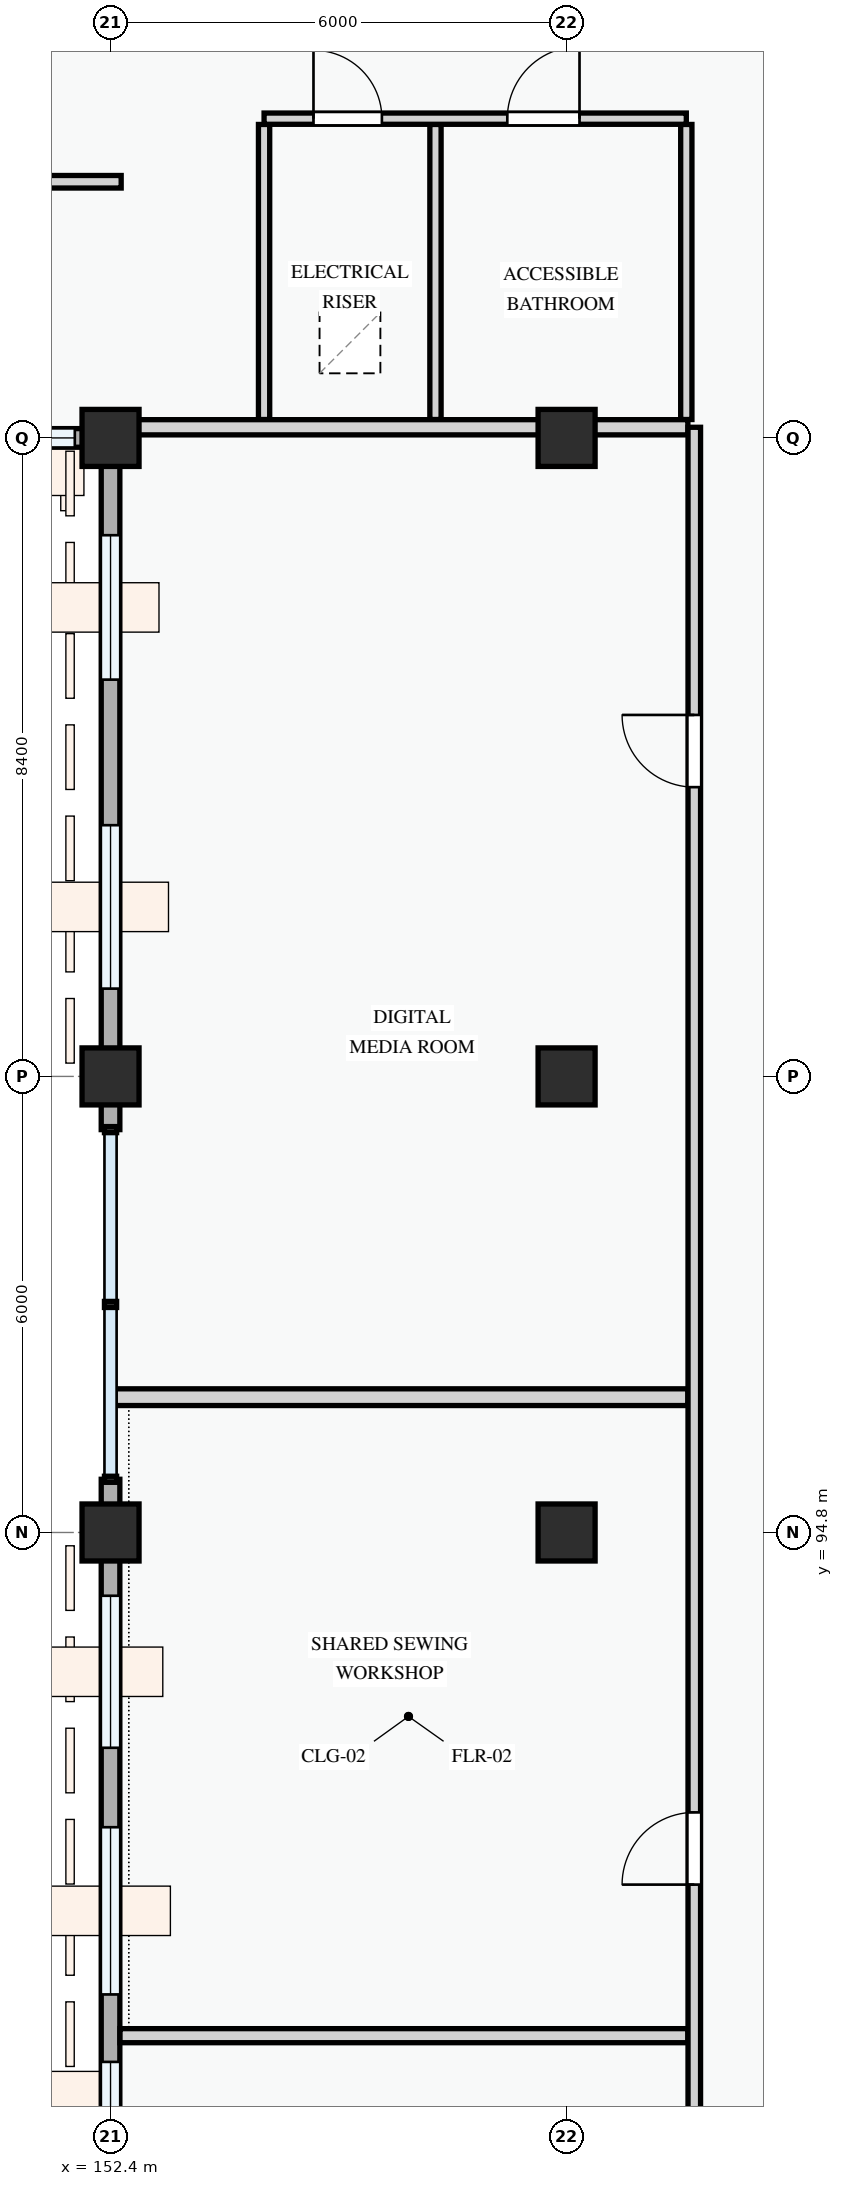
"""IFC4 building model, lengths in metres.
Left out: names, types, materials, properties, quantities, classifications, styles, units other than length and angle.
Written with IfcOpenShell. Run it as: python <this file> out.ifc"""

import sys

from ifc_helpers import new_model, si_unit, direction, frame, frame_2d, origin, origin_2d, place, context, subcontext, project, spatial, rectangle, extrude, element, fill, save


model = new_model("IFC4")
c1 = context("Model", 3, precision=1e-05, world=origin(), true_north=direction((0.0, 1.0)))
c2 = subcontext(c1, "Body", "Model", "MODEL_VIEW")
j1 = project(units=[si_unit("LENGTHUNIT", "METRE"), si_unit("PLANEANGLEUNIT", "RADIAN")], contexts=[c1])
p1 = place(None, origin())
s1 = spatial("IfcSite", under=j1, at=p1, CompositionType="ELEMENT")
p2 = place(p1, origin())
s2 = spatial("IfcBuilding", under=s1, at=p2, CompositionType="ELEMENT")
p3 = place(p2, frame((0.0, 0.0, 4.5)))
s3 = spatial("IfcBuildingStorey", under=s2, at=p3, CompositionType="ELEMENT", Elevation=4.5)
for number, where, z_axis, x_axis in (
    (1, (152.4, 94.8, 0.0), (0.0, 0.0, 1.0), (1.0, 0.0, 0.0)),
    (2, (152.4, 100.8, 0.0), (0.0, 0.0, 1.0), (1.0, 0.0, 0.0)),
    (3, (152.4, 109.2, 0.0), (0.0, 0.0, 1.0), (1.0, 0.0, 0.0)),
    (4, (158.4, 94.8, 0.0), (0.0, 0.0, 1.0), (1.0, 0.0, 0.0)),
    (5, (158.4, 100.8, 0.0), (0.0, 0.0, 1.0), (1.0, 0.0, 0.0)),
    (6, (158.4, 109.2, 0.0), (0.0, 0.0, 1.0), (1.0, 0.0, 0.0)),
):
    element("IfcColumn", number, at=place(p3, frame(where, z_axis=z_axis, x_axis=x_axis)), inside=s3, PredefinedType="COLUMN", context=c2, shape_type="SweptSolid", body=[
        extrude(rectangle(XDim=0.75, YDim=0.75, at=origin_2d()), origin(), (0.0, 0.0, 1.0), 3.6),
    ])
p4 = place(p3, frame((144.0, 109.2, 0.0), z_axis=(0.0, 0.0, 1.0), x_axis=(1.0, 0.0, 0.0)))
e7 = element("IfcWall", 7, at=p4, inside=s3, PredefinedType="STANDARD", context=c2, shape_type="SweptSolid", body=[
    extrude(rectangle(XDim=8.4, YDim=0.245, at=frame_2d((4.2, 0.0))), origin(), (0.0, 0.0, 1.0), 2.675),
])
p5 = place(p4, frame((1.015, 0.0, 0.78)))
e8 = element("IfcOpeningElement", 8, at=p5, cuts=e7, PredefinedType="OPENING", context=c2, shape_type="SweptSolid", body=[
    extrude(rectangle(XDim=1.35, YDim=1.55, at=frame_2d((0.675, 0.775))), frame((0.0, 0.133, 0.0), z_axis=(0.0, -1.0, 0.0), x_axis=(1.0, 0.0, 0.0)), (0.0, 0.0, 1.0), 0.265),
])
p6 = place(p4, frame((3.75, 0.0, 0.78)))
e9 = element("IfcOpeningElement", 9, at=p6, cuts=e7, PredefinedType="OPENING", context=c2, shape_type="SweptSolid", body=[
    extrude(rectangle(XDim=1.6, YDim=1.75, at=frame_2d((0.8, 0.875))), frame((0.0, 0.133, 0.0), z_axis=(0.0, -1.0, 0.0), x_axis=(1.0, 0.0, 0.0)), (0.0, 0.0, 1.0), 0.265),
])
p7 = place(p4, frame((6.33, 0.0, 0.78)))
e10 = element("IfcOpeningElement", 10, at=p7, cuts=e7, PredefinedType="OPENING", context=c2, shape_type="SweptSolid", body=[
    extrude(rectangle(XDim=1.6, YDim=1.75, at=frame_2d((0.8, 0.875))), frame((0.0, 0.133, 0.0), z_axis=(0.0, -1.0, 0.0), x_axis=(1.0, 0.0, 0.0)), (0.0, 0.0, 1.0), 0.265),
])
p8 = place(p3, frame((152.4, 109.2, 0.0), z_axis=(0.0, 0.0, 1.0), x_axis=(0.0, -1.0, 0.0)))
e11 = element("IfcWall", 11, at=p8, inside=s3, PredefinedType="STANDARD", context=c2, shape_type="SweptSolid", body=[
    extrude(rectangle(XDim=8.4, YDim=0.245, at=frame_2d((4.2, 0.0))), origin(), (0.0, 0.0, 1.0), 2.725),
])
p9 = place(p8, frame((1.28, 0.0, 0.78)))
e12 = element("IfcOpeningElement", 12, at=p9, cuts=e11, PredefinedType="OPENING", context=c2, shape_type="SweptSolid", body=[
    extrude(rectangle(XDim=1.9, YDim=1.55, at=frame_2d((0.95, 0.775))), frame((0.0, 0.133, 0.0), z_axis=(0.0, -1.0, 0.0), x_axis=(1.0, 0.0, 0.0)), (0.0, 0.0, 1.0), 0.265),
])
p10 = place(p8, frame((5.095, 0.0, 0.78)))
e13 = element("IfcOpeningElement", 13, at=p10, cuts=e11, PredefinedType="OPENING", context=c2, shape_type="SweptSolid", body=[
    extrude(rectangle(XDim=2.15, YDim=1.65, at=frame_2d((1.075, 0.825))), frame((0.0, 0.133, 0.0), z_axis=(0.0, -1.0, 0.0), x_axis=(1.0, 0.0, 0.0)), (0.0, 0.0, 1.0), 0.265),
])
for number, where, z_axis, x_axis in (
    (14, (152.4, 100.8, 0.0), (0.0, 0.0, 1.0), (0.0, -1.0, 0.0)),
    (15, (152.4, 95.5, 0.0), (0.0, 0.0, 1.0), (0.0, -1.0, 0.0)),
):
    element("IfcWall", number, at=place(p3, frame(where, z_axis=z_axis, x_axis=x_axis)), inside=s3, PredefinedType="STANDARD", context=c2, shape_type="SweptSolid", body=[
        extrude(rectangle(XDim=0.7, YDim=0.245, at=frame_2d((0.35, 0.0))), origin(), (0.0, 0.0, 1.0), 2.875),
    ])
p11 = place(p3, frame((152.4, 94.8, 0.0), z_axis=(0.0, 0.0, 1.0), x_axis=(0.0, -1.0, 0.0)))
e16 = element("IfcWall", 16, at=p11, inside=s3, PredefinedType="STANDARD", context=c2, shape_type="SweptSolid", body=[
    extrude(rectangle(XDim=8.4, YDim=0.245, at=frame_2d((4.2, 0.0))), origin(), (0.0, 0.0, 1.0), 2.725),
])
p12 = place(p11, frame((0.833, 0.0, 0.78)))
e17 = element("IfcOpeningElement", 17, at=p12, cuts=e16, PredefinedType="OPENING", context=c2, shape_type="SweptSolid", body=[
    extrude(rectangle(XDim=2.0, YDim=1.5, at=frame_2d((1.0, 0.75))), frame((0.0, 0.133, 0.0), z_axis=(0.0, -1.0, 0.0), x_axis=(1.0, 0.0, 0.0)), (0.0, 0.0, 1.0), 0.265),
])
p13 = place(p11, frame((3.877, 0.0, 0.78)))
e18 = element("IfcOpeningElement", 18, at=p13, cuts=e16, PredefinedType="OPENING", context=c2, shape_type="SweptSolid", body=[
    extrude(rectangle(XDim=2.2, YDim=1.75, at=frame_2d((1.1, 0.875))), frame((0.0, 0.133, 0.0), z_axis=(0.0, -1.0, 0.0), x_axis=(1.0, 0.0, 0.0)), (0.0, 0.0, 1.0), 0.265),
])
p14 = place(p11, frame((6.965, 0.0, 0.78)))
e19 = element("IfcOpeningElement", 19, at=p14, cuts=e16, PredefinedType="OPENING", context=c2, shape_type="SweptSolid", body=[
    extrude(rectangle(XDim=0.9, YDim=1.2, at=frame_2d((0.45, 0.6))), frame((0.0, 0.133, 0.0), z_axis=(0.0, -1.0, 0.0), x_axis=(1.0, 0.0, 0.0)), (0.0, 0.0, 1.0), 0.265),
])
for number, where, z_axis, x_axis in (
    (20, (154.42, 113.324, 0.0), (0.0, 0.0, 1.0), (0.0, -1.0, 0.0)),
    (21, (156.675, 113.324, 0.0), (0.0, 0.0, 1.0), (0.0, -1.0, 0.0)),
    (22, (159.975, 113.324, 0.0), (0.0, 0.0, 1.0), (0.0, -1.0, 0.0)),
):
    element("IfcWall", number, at=place(p3, frame(where, z_axis=z_axis, x_axis=x_axis)), inside=s3, PredefinedType="PARTITIONING", context=c2, shape_type="SweptSolid", body=[
        extrude(rectangle(XDim=3.882, YDim=0.148, at=frame_2d((1.941, 0.0))), origin(), (0.0, 0.0, 1.0), 3.3),
    ])
p15 = place(p3, frame((154.42, 113.4, 0.0), z_axis=(0.0, 0.0, 1.0), x_axis=(1.0, 0.0, 0.0)))
e23 = element("IfcWall", 23, at=p15, inside=s3, PredefinedType="PARTITIONING", context=c2, shape_type="SweptSolid", body=[
    extrude(rectangle(XDim=5.555, YDim=0.148, at=frame_2d((2.778, 0.0))), origin(), (0.0, 0.0, 1.0), 3.3),
])
p16 = place(p15, frame((0.65, 0.0, 0.0)))
e24 = element("IfcOpeningElement", 24, at=p16, cuts=e23, PredefinedType="OPENING", context=c2, shape_type="SweptSolid", body=[
    extrude(rectangle(XDim=0.9, YDim=2.1, at=frame_2d((0.45, 1.05))), frame((0.0, 0.084, 0.0), z_axis=(0.0, -1.0, 0.0), x_axis=(1.0, 0.0, 0.0)), (0.0, 0.0, 1.0), 0.168),
])
p17 = place(p15, frame((3.2, 0.0, 0.0)))
e25 = element("IfcOpeningElement", 25, at=p17, cuts=e23, PredefinedType="OPENING", context=c2, shape_type="SweptSolid", body=[
    extrude(rectangle(XDim=0.95, YDim=2.1, at=frame_2d((0.475, 1.05))), frame((0.0, 0.084, 0.0), z_axis=(0.0, -1.0, 0.0), x_axis=(1.0, 0.0, 0.0)), (0.0, 0.0, 1.0), 0.168),
])
p18 = place(p3, frame((150.127, 112.57, 0.0), z_axis=(0.0, 0.0, 1.0), x_axis=(1.0, 0.0, 0.0)))
e26 = element("IfcWall", 26, at=p18, inside=s3, PredefinedType="PARTITIONING", context=c2, shape_type="SweptSolid", body=[
    extrude(rectangle(XDim=2.413, YDim=0.165, at=frame_2d((1.207, 0.0))), origin(), (0.0, 0.0, 1.0), 3.3),
])
p19 = place(p3, frame((152.524, 88.18, 0.0), z_axis=(0.0, 0.0, 1.0), x_axis=(1.0, 0.0, 0.0)))
e27 = element("IfcWall", 27, at=p19, inside=s3, PredefinedType="PARTITIONING", context=c2, shape_type="SweptSolid", body=[
    extrude(rectangle(XDim=7.471, YDim=0.185, at=frame_2d((3.736, 0.0))), origin(), (0.0, 0.0, 1.0), 3.3),
])
p20 = place(p3, frame((152.46, 96.58, 0.0), z_axis=(0.0, 0.0, 1.0), x_axis=(1.0, 0.0, 0.0)))
e28 = element("IfcWall", 28, at=p20, inside=s3, PredefinedType="PARTITIONING", context=c2, shape_type="SweptSolid", body=[
    extrude(rectangle(XDim=7.536, YDim=0.22, at=frame_2d((3.768, 0.0))), origin(), (0.0, 0.0, 1.0), 3.3),
])
p21 = place(p3, frame((152.46, 109.34, 0.0), z_axis=(0.0, 0.0, 1.0), x_axis=(1.0, 0.0, 0.0)))
e29 = element("IfcWall", 29, at=p21, inside=s3, PredefinedType="PARTITIONING", context=c2, shape_type="SweptSolid", body=[
    extrude(rectangle(XDim=7.536, YDim=0.2, at=frame_2d((3.768, 0.0))), origin(), (0.0, 0.0, 1.0), 2.675),
])
p22 = place(p3, frame((160.08, 80.46, 0.0), z_axis=(0.0, 0.0, 1.0), x_axis=(0.0, 1.0, 0.0)))
e30 = element("IfcWall", 30, at=p22, inside=s3, PredefinedType="PARTITIONING", context=c2, shape_type="SweptSolid", body=[
    extrude(rectangle(XDim=28.88, YDim=0.165, at=frame_2d((14.44, 0.0))), origin(), (0.0, 0.0, 1.0), 3.3),
])
p23 = place(p22, frame((2.405, 0.0, 0.0)))
e31 = element("IfcOpeningElement", 31, at=p23, cuts=e30, PredefinedType="OPENING", context=c2, shape_type="SweptSolid", body=[
    extrude(rectangle(XDim=0.95, YDim=2.1, at=frame_2d((0.475, 1.05))), frame((0.0, 0.093, 0.0), z_axis=(0.0, -1.0, 0.0), x_axis=(1.0, 0.0, 0.0)), (0.0, 0.0, 1.0), 0.185),
])
p24 = place(p22, frame((9.708, 0.0, 0.0)))
e32 = element("IfcOpeningElement", 32, at=p24, cuts=e30, PredefinedType="OPENING", context=c2, shape_type="SweptSolid", body=[
    extrude(rectangle(XDim=0.95, YDim=2.1, at=frame_2d((0.475, 1.05))), frame((0.0, 0.093, 0.0), z_axis=(0.0, -1.0, 0.0), x_axis=(1.0, 0.0, 0.0)), (0.0, 0.0, 1.0), 0.185),
])
p25 = place(p22, frame((24.146, 0.0, 0.0)))
e33 = element("IfcOpeningElement", 33, at=p25, cuts=e30, PredefinedType="OPENING", context=c2, shape_type="SweptSolid", body=[
    extrude(rectangle(XDim=0.95, YDim=2.1, at=frame_2d((0.475, 1.05))), frame((0.0, 0.093, 0.0), z_axis=(0.0, -1.0, 0.0), x_axis=(1.0, 0.0, 0.0)), (0.0, 0.0, 1.0), 0.185),
])
p26 = place(p7, origin())
e34 = element("IfcWindow", 34, at=p26, inside=s3, PartitioningType="DOUBLE_PANEL_VERTICAL", PredefinedType="WINDOW", context=c2, shape_type="SweptSolid", body=[
    extrude(rectangle(XDim=1.6, YDim=1.75, at=frame_2d((0.8, 0.875))), frame((0.0, 0.03, 0.0), z_axis=(0.0, -1.0, 0.0), x_axis=(1.0, 0.0, 0.0)), (0.0, 0.0, 1.0), 0.06),
])
fill(e10, e34)
p27 = place(p9, origin())
e35 = element("IfcWindow", 35, at=p27, inside=s3, PartitioningType="DOUBLE_PANEL_VERTICAL", PredefinedType="WINDOW", context=c2, shape_type="SweptSolid", body=[
    extrude(rectangle(XDim=1.9, YDim=1.55, at=frame_2d((0.95, 0.775))), frame((0.0, 0.03, 0.0), z_axis=(0.0, -1.0, 0.0), x_axis=(1.0, 0.0, 0.0)), (0.0, 0.0, 1.0), 0.06),
])
fill(e12, e35)
p28 = place(p10, origin())
e36 = element("IfcWindow", 36, at=p28, inside=s3, PartitioningType="DOUBLE_PANEL_VERTICAL", PredefinedType="WINDOW", context=c2, shape_type="SweptSolid", body=[
    extrude(rectangle(XDim=2.15, YDim=1.65, at=frame_2d((1.075, 0.825))), frame((0.0, 0.03, 0.0), z_axis=(0.0, -1.0, 0.0), x_axis=(1.0, 0.0, 0.0)), (0.0, 0.0, 1.0), 0.06),
])
fill(e13, e36)
p29 = place(p12, origin())
e37 = element("IfcWindow", 37, at=p29, inside=s3, PartitioningType="DOUBLE_PANEL_VERTICAL", PredefinedType="WINDOW", context=c2, shape_type="SweptSolid", body=[
    extrude(rectangle(XDim=2.0, YDim=1.5, at=frame_2d((1.0, 0.75))), frame((0.0, 0.03, 0.0), z_axis=(0.0, -1.0, 0.0), x_axis=(1.0, 0.0, 0.0)), (0.0, 0.0, 1.0), 0.06),
])
fill(e17, e37)
p30 = place(p13, origin())
e38 = element("IfcWindow", 38, at=p30, inside=s3, PartitioningType="DOUBLE_PANEL_VERTICAL", PredefinedType="WINDOW", context=c2, shape_type="SweptSolid", body=[
    extrude(rectangle(XDim=2.2, YDim=1.75, at=frame_2d((1.1, 0.875))), frame((0.0, 0.03, 0.0), z_axis=(0.0, -1.0, 0.0), x_axis=(1.0, 0.0, 0.0)), (0.0, 0.0, 1.0), 0.06),
])
fill(e18, e38)
p31 = place(p14, origin())
e39 = element("IfcWindow", 39, at=p31, inside=s3, PartitioningType="SINGLE_PANEL", PredefinedType="WINDOW", context=c2, shape_type="SweptSolid", body=[
    extrude(rectangle(XDim=0.9, YDim=1.2, at=frame_2d((0.45, 0.6))), frame((0.0, 0.03, 0.0), z_axis=(0.0, -1.0, 0.0), x_axis=(1.0, 0.0, 0.0)), (0.0, 0.0, 1.0), 0.06),
])
fill(e19, e39)
p32 = place(p16, origin())
e40 = element("IfcDoor", 40, at=p32, inside=s3, OperationType="SINGLE_SWING_LEFT", PredefinedType="DOOR", context=c2, shape_type="SweptSolid", body=[
    extrude(rectangle(XDim=0.9, YDim=2.1, at=frame_2d((0.45, 1.05))), frame((0.0, 0.025, 0.0), z_axis=(0.0, -1.0, 0.0), x_axis=(1.0, 0.0, 0.0)), (0.0, 0.0, 1.0), 0.05),
])
fill(e24, e40)
p33 = place(p17, origin())
e41 = element("IfcDoor", 41, at=p33, inside=s3, OperationType="SINGLE_SWING_RIGHT", PredefinedType="DOOR", context=c2, shape_type="SweptSolid", body=[
    extrude(rectangle(XDim=0.95, YDim=2.1, at=frame_2d((0.475, 1.05))), frame((0.0, 0.025, 0.0), z_axis=(0.0, -1.0, 0.0), x_axis=(1.0, 0.0, 0.0)), (0.0, 0.0, 1.0), 0.05),
])
fill(e25, e41)
p34 = place(p24, origin())
e42 = element("IfcDoor", 42, at=p34, inside=s3, OperationType="SINGLE_SWING_LEFT", PredefinedType="DOOR", context=c2, shape_type="SweptSolid", body=[
    extrude(rectangle(XDim=0.95, YDim=2.1, at=frame_2d((0.475, 1.05))), frame((0.0, 0.025, 0.0), z_axis=(0.0, -1.0, 0.0), x_axis=(1.0, 0.0, 0.0)), (0.0, 0.0, 1.0), 0.05),
])
fill(e32, e42)
p35 = place(p25, origin())
e43 = element("IfcDoor", 43, at=p35, inside=s3, OperationType="SINGLE_SWING_RIGHT", PredefinedType="DOOR", context=c2, shape_type="SweptSolid", body=[
    extrude(rectangle(XDim=0.95, YDim=2.1, at=frame_2d((0.475, 1.05))), frame((0.0, 0.025, 0.0), z_axis=(0.0, -1.0, 0.0), x_axis=(1.0, 0.0, 0.0)), (0.0, 0.0, 1.0), 0.05),
])
fill(e33, e43)
save(model, sys.argv[1])
